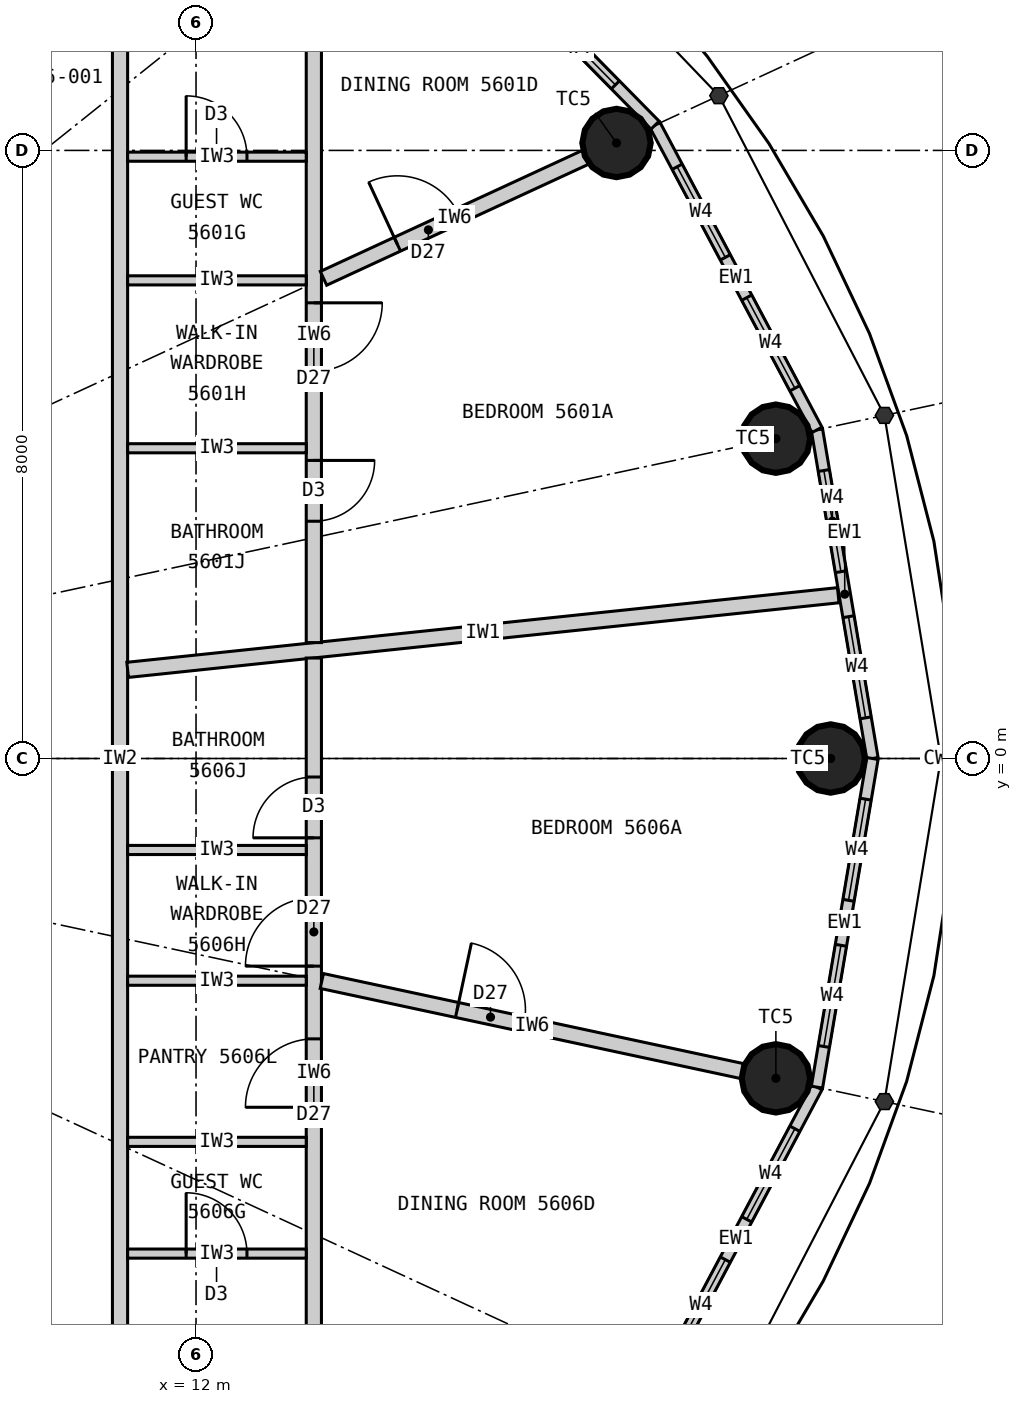
"""IFC4 building model, lengths in metres.
Left out: names, types, materials, properties, quantities, classifications, styles, units other than length and angle.
Written with IfcOpenShell. Run it as: python <this file> out.ifc"""

import sys

from ifc_helpers import new_model, si_unit, direction, frame, frame_2d, origin, origin_2d, place, context, subcontext, project, spatial, rectangle, circle, extrude, element, fill, save


model = new_model("IFC4")
c1 = context("Model", 3, precision=1e-05, world=origin(), true_north=direction((0.0, 1.0)))
c2 = subcontext(c1, "Body", "Model", "MODEL_VIEW")
j1 = project(units=[si_unit("LENGTHUNIT", "METRE"), si_unit("PLANEANGLEUNIT", "RADIAN")], contexts=[c1])
p1 = place(None, origin())
s1 = spatial("IfcSite", under=j1, at=p1, CompositionType="ELEMENT")
p2 = place(p1, origin())
s2 = spatial("IfcBuilding", under=s1, at=p2, CompositionType="ELEMENT")
p3 = place(p2, frame((0.0, 0.0, 209.4)))
s3 = spatial("IfcBuildingStorey", under=s2, at=p3, CompositionType="ELEMENT", Elevation=209.4)
for number, where, z_axis, x_axis in (
    (1, (20.35, 0.0, 0.0), (0.0, 0.0, 1.0), (1.0, 0.0, 0.0)),
    (2, (19.629, 4.208, 0.0), (0.0, 0.0, 1.0), (1.0, 0.0, 0.0)),
    (3, (17.532, 8.098, 0.0), (0.0, 0.0, 1.0), (1.0, 0.0, 0.0)),
    (4, (19.629, -4.208, 0.0), (0.0, 0.0, 1.0), (1.0, 0.0, 0.0)),
):
    element("IfcColumn", number, at=place(p3, frame(where, z_axis=z_axis, x_axis=x_axis)), inside=s3, PredefinedType="COLUMN", context=c2, shape_type="SweptSolid", body=[
        extrude(circle(Radius=0.45, at=origin_2d()), origin(), (0.0, 0.0, 1.0), 3.3),
    ])
p4 = place(p3, frame((20.9, 0.0, 0.0), z_axis=(0.0, 0.0, 1.0), x_axis=(-0.166538513568, 0.986034950445, 0.0)))
e5 = element("IfcWall", 5, at=p4, inside=s3, PredefinedType="ELEMENTEDWALL", context=c2, shape_type="SweptSolid", body=[
    extrude(rectangle(XDim=4.385, YDim=0.15, at=frame_2d((2.192, 0.0))), origin(), (0.0, 0.0, 1.0), 3.12),
])
p5 = place(p4, frame((0.542, 0.0, 0.9)))
e6 = element("IfcOpeningElement", 6, at=p5, cuts=e5, PredefinedType="OPENING", context=c2, shape_type="SweptSolid", body=[
    extrude(rectangle(XDim=1.35, YDim=1.9, at=frame_2d((0.675, 0.95))), frame((0.0, 0.085, 0.0), z_axis=(0.0, -1.0, 0.0), x_axis=(1.0, 0.0, 0.0)), (0.0, 0.0, 1.0), 0.17),
])
p6 = place(p4, frame((2.492, 0.0, 0.9)))
e7 = element("IfcOpeningElement", 7, at=p6, cuts=e5, PredefinedType="OPENING", context=c2, shape_type="SweptSolid", body=[
    extrude(rectangle(XDim=1.35, YDim=1.9, at=frame_2d((0.675, 0.95))), frame((0.0, 0.085, 0.0), z_axis=(0.0, -1.0, 0.0), x_axis=(1.0, 0.0, 0.0)), (0.0, 0.0, 1.0), 0.17),
])
p7 = place(p3, frame((20.17, 4.323, 0.0), z_axis=(0.0, 0.0, 1.0), x_axis=(-0.469256152955, 0.883062094597, 0.0)))
e8 = element("IfcWall", 8, at=p7, inside=s3, PredefinedType="ELEMENTEDWALL", context=c2, shape_type="SweptSolid", body=[
    extrude(rectangle(XDim=4.539, YDim=0.15, at=frame_2d((2.27, 0.0))), origin(), (0.0, 0.0, 1.0), 3.12),
])
p8 = place(p7, frame((0.62, 0.0, 0.9)))
e9 = element("IfcOpeningElement", 9, at=p8, cuts=e8, PredefinedType="OPENING", context=c2, shape_type="SweptSolid", body=[
    extrude(rectangle(XDim=1.35, YDim=1.9, at=frame_2d((0.675, 0.95))), frame((0.0, 0.085, 0.0), z_axis=(0.0, -1.0, 0.0), x_axis=(1.0, 0.0, 0.0)), (0.0, 0.0, 1.0), 0.17),
])
p9 = place(p7, frame((2.57, 0.0, 0.9)))
e10 = element("IfcOpeningElement", 10, at=p9, cuts=e8, PredefinedType="OPENING", context=c2, shape_type="SweptSolid", body=[
    extrude(rectangle(XDim=1.35, YDim=1.9, at=frame_2d((0.675, 0.95))), frame((0.0, 0.085, 0.0), z_axis=(0.0, -1.0, 0.0), x_axis=(1.0, 0.0, 0.0)), (0.0, 0.0, 1.0), 0.17),
])
p10 = place(p3, frame((18.04, 8.332, 0.0), z_axis=(0.0, 0.0, 1.0), x_axis=(-0.701527379618, 0.712642501993, 0.0)))
e11 = element("IfcWall", 11, at=p10, inside=s3, PredefinedType="ELEMENTEDWALL", context=c2, shape_type="SweptSolid", body=[
    extrude(rectangle(XDim=4.788, YDim=0.15, at=frame_2d((2.394, 0.0))), origin(), (0.0, 0.0, 1.0), 3.12),
])
p11 = place(p10, frame((0.744, 0.0, 0.9)))
e12 = element("IfcOpeningElement", 12, at=p11, cuts=e11, PredefinedType="OPENING", context=c2, shape_type="SweptSolid", body=[
    extrude(rectangle(XDim=1.35, YDim=1.9, at=frame_2d((0.675, 0.95))), frame((0.0, 0.085, 0.0), z_axis=(0.0, -1.0, 0.0), x_axis=(1.0, 0.0, 0.0)), (0.0, 0.0, 1.0), 0.17),
])
p12 = place(p10, frame((2.694, 0.0, 0.9)))
e13 = element("IfcOpeningElement", 13, at=p12, cuts=e11, PredefinedType="OPENING", context=c2, shape_type="SweptSolid", body=[
    extrude(rectangle(XDim=1.35, YDim=1.9, at=frame_2d((0.675, 0.95))), frame((0.0, 0.085, 0.0), z_axis=(0.0, -1.0, 0.0), x_axis=(1.0, 0.0, 0.0)), (0.0, 0.0, 1.0), 0.17),
])
p13 = place(p3, frame((18.04, -8.332, 0.0), z_axis=(0.0, 0.0, 1.0), x_axis=(0.469256152955, 0.883062094597, 0.0)))
e14 = element("IfcWall", 14, at=p13, inside=s3, PredefinedType="ELEMENTEDWALL", context=c2, shape_type="SweptSolid", body=[
    extrude(rectangle(XDim=4.539, YDim=0.15, at=frame_2d((2.27, 0.0))), origin(), (0.0, 0.0, 1.0), 3.12),
])
p14 = place(p13, frame((0.62, 0.0, 0.9)))
e15 = element("IfcOpeningElement", 15, at=p14, cuts=e14, PredefinedType="OPENING", context=c2, shape_type="SweptSolid", body=[
    extrude(rectangle(XDim=1.35, YDim=1.9, at=frame_2d((0.675, 0.95))), frame((0.0, 0.085, 0.0), z_axis=(0.0, -1.0, 0.0), x_axis=(1.0, 0.0, 0.0)), (0.0, 0.0, 1.0), 0.17),
])
p15 = place(p13, frame((2.57, 0.0, 0.9)))
e16 = element("IfcOpeningElement", 16, at=p15, cuts=e14, PredefinedType="OPENING", context=c2, shape_type="SweptSolid", body=[
    extrude(rectangle(XDim=1.35, YDim=1.9, at=frame_2d((0.675, 0.95))), frame((0.0, 0.085, 0.0), z_axis=(0.0, -1.0, 0.0), x_axis=(1.0, 0.0, 0.0)), (0.0, 0.0, 1.0), 0.17),
])
p16 = place(p3, frame((20.17, -4.323, 0.0), z_axis=(0.0, 0.0, 1.0), x_axis=(0.166538513568, 0.986034950445, 0.0)))
e17 = element("IfcWall", 17, at=p16, inside=s3, PredefinedType="ELEMENTEDWALL", context=c2, shape_type="SweptSolid", body=[
    extrude(rectangle(XDim=4.385, YDim=0.15, at=frame_2d((2.192, 0.0))), origin(), (0.0, 0.0, 1.0), 3.12),
])
p17 = place(p16, frame((0.542, 0.0, 0.9)))
e18 = element("IfcOpeningElement", 18, at=p17, cuts=e17, PredefinedType="OPENING", context=c2, shape_type="SweptSolid", body=[
    extrude(rectangle(XDim=1.35, YDim=1.9, at=frame_2d((0.675, 0.95))), frame((0.0, 0.085, 0.0), z_axis=(0.0, -1.0, 0.0), x_axis=(1.0, 0.0, 0.0)), (0.0, 0.0, 1.0), 0.17),
])
p18 = place(p16, frame((2.492, 0.0, 0.9)))
e19 = element("IfcOpeningElement", 19, at=p18, cuts=e17, PredefinedType="OPENING", context=c2, shape_type="SweptSolid", body=[
    extrude(rectangle(XDim=1.35, YDim=1.9, at=frame_2d((0.675, 0.95))), frame((0.0, 0.085, 0.0), z_axis=(0.0, -1.0, 0.0), x_axis=(1.0, 0.0, 0.0)), (0.0, 0.0, 1.0), 0.17),
])
p19 = place(p3, frame((11.0, -9.9, 0.0), z_axis=(0.0, 0.0, 1.0), x_axis=(0.0, 1.0, 0.0)))
e20 = element("IfcWall", 20, at=p19, inside=s3, PredefinedType="PARTITIONING", context=c2, shape_type="SweptSolid", body=[
    extrude(rectangle(XDim=19.8, YDim=0.2, at=frame_2d((9.9, 0.0))), origin(), (0.0, 0.0, 1.0), 3.12),
])
p20 = place(p3, frame((11.1, 1.166, 0.0), z_axis=(0.0, 0.0, 1.0), x_axis=(0.994527487125, 0.104475247564, 0.0)))
e21 = element("IfcWall", 21, at=p20, inside=s3, PredefinedType="PARTITIONING", context=c2, shape_type="SweptSolid", body=[
    extrude(rectangle(XDim=9.401, YDim=0.2, at=frame_2d((4.701, 0.0))), origin(), (0.0, 0.0, 1.0), 2.47),
])
p21 = place(p3, frame((13.55, 1.525, 0.0), z_axis=(0.0, 0.0, 1.0), x_axis=(0.0, 1.0, 0.0)))
e22 = element("IfcWall", 22, at=p21, inside=s3, PredefinedType="PARTITIONING", context=c2, shape_type="SweptSolid", body=[
    extrude(rectangle(XDim=8.084, YDim=0.2, at=frame_2d((4.042, 0.0))), origin(), (0.0, 0.0, 1.0), 3.12),
])
p22 = place(p21, frame((1.597, 0.0, 0.0)))
e23 = element("IfcOpeningElement", 23, at=p22, cuts=e22, PredefinedType="OPENING", context=c2, shape_type="SweptSolid", body=[
    extrude(rectangle(XDim=0.8, YDim=2.1, at=frame_2d((0.4, 1.05))), frame((0.0, 0.11, 0.0), z_axis=(0.0, -1.0, 0.0), x_axis=(1.0, 0.0, 0.0)), (0.0, 0.0, 1.0), 0.22),
])
p23 = place(p21, frame((3.57, 0.0, 0.0)))
e24 = element("IfcOpeningElement", 24, at=p23, cuts=e22, PredefinedType="OPENING", context=c2, shape_type="SweptSolid", body=[
    extrude(rectangle(XDim=0.9, YDim=2.1, at=frame_2d((0.45, 1.05))), frame((0.0, 0.11, 0.0), z_axis=(0.0, -1.0, 0.0), x_axis=(1.0, 0.0, 0.0)), (0.0, 0.0, 1.0), 0.22),
])
p24 = place(p3, frame((13.677, 6.317, 0.0), z_axis=(0.0, 0.0, 1.0), x_axis=(0.907825704695, 0.419347695708, 0.0)))
e25 = element("IfcWall", 25, at=p24, inside=s3, PredefinedType="PARTITIONING", context=c2, shape_type="SweptSolid", body=[
    extrude(rectangle(XDim=3.796, YDim=0.2, at=frame_2d((1.898, 0.0))), origin(), (0.0, 0.0, 1.0), 2.32),
])
p25 = place(p24, frame((1.07, 0.0, 0.0)))
e26 = element("IfcOpeningElement", 26, at=p25, cuts=e25, PredefinedType="OPENING", context=c2, shape_type="SweptSolid", body=[
    extrude(rectangle(XDim=0.9, YDim=2.1, at=frame_2d((0.45, 1.05))), frame((0.0, 0.11, 0.0), z_axis=(0.0, -1.0, 0.0), x_axis=(1.0, 0.0, 0.0)), (0.0, 0.0, 1.0), 0.22),
])
for number, where, z_axis, x_axis in (
    (27, (11.1, 4.082, 0.0), (0.0, 0.0, 1.0), (1.0, 0.0, 0.0)),
    (28, (11.1, 6.29, 0.0), (0.0, 0.0, 1.0), (1.0, 0.0, 0.0)),
):
    element("IfcWall", number, at=place(p3, frame(where, z_axis=z_axis, x_axis=x_axis)), inside=s3, PredefinedType="PARTITIONING", context=c2, shape_type="SweptSolid", body=[
        extrude(rectangle(XDim=2.35, YDim=0.12, at=frame_2d((1.175, 0.0))), origin(), (0.0, 0.0, 1.0), 3.12),
    ])
p26 = place(p3, frame((11.1, 7.917, 0.0), z_axis=(0.0, 0.0, 1.0), x_axis=(1.0, 0.0, 0.0)))
e29 = element("IfcWall", 29, at=p26, inside=s3, PredefinedType="PARTITIONING", context=c2, shape_type="SweptSolid", body=[
    extrude(rectangle(XDim=2.35, YDim=0.12, at=frame_2d((1.175, 0.0))), origin(), (0.0, 0.0, 1.0), 3.12),
])
p27 = place(p26, frame((0.77, 0.0, 0.0)))
e30 = element("IfcOpeningElement", 30, at=p27, cuts=e29, PredefinedType="OPENING", context=c2, shape_type="SweptSolid", body=[
    extrude(rectangle(XDim=0.8, YDim=2.1, at=frame_2d((0.4, 1.05))), frame((0.0, 0.07, 0.0), z_axis=(0.0, -1.0, 0.0), x_axis=(1.0, 0.0, 0.0)), (0.0, 0.0, 1.0), 0.14),
])
p28 = place(p3, frame((13.55, -9.609, 0.0), z_axis=(0.0, 0.0, 1.0), x_axis=(0.0, 1.0, 0.0)))
e31 = element("IfcWall", 31, at=p28, inside=s3, PredefinedType="PARTITIONING", context=c2, shape_type="SweptSolid", body=[
    extrude(rectangle(XDim=10.93, YDim=0.2, at=frame_2d((5.465, 0.0))), origin(), (0.0, 0.0, 1.0), 3.12),
])
p29 = place(p28, frame((5.02, 0.0, 0.0)))
e32 = element("IfcOpeningElement", 32, at=p29, cuts=e31, PredefinedType="OPENING", context=c2, shape_type="SweptSolid", body=[
    extrude(rectangle(XDim=0.9, YDim=2.1, at=frame_2d((0.45, 1.05))), frame((0.0, 0.11, 0.0), z_axis=(0.0, -1.0, 0.0), x_axis=(1.0, 0.0, 0.0)), (0.0, 0.0, 1.0), 0.22),
])
p30 = place(p28, frame((6.877, 0.0, 0.0)))
e33 = element("IfcOpeningElement", 33, at=p30, cuts=e31, PredefinedType="OPENING", context=c2, shape_type="SweptSolid", body=[
    extrude(rectangle(XDim=0.9, YDim=2.1, at=frame_2d((0.45, 1.05))), frame((0.0, 0.11, 0.0), z_axis=(0.0, -1.0, 0.0), x_axis=(1.0, 0.0, 0.0)), (0.0, 0.0, 1.0), 0.22),
])
p31 = place(p28, frame((8.565, 0.0, 0.0)))
e34 = element("IfcOpeningElement", 34, at=p31, cuts=e31, PredefinedType="OPENING", context=c2, shape_type="SweptSolid", body=[
    extrude(rectangle(XDim=0.8, YDim=2.1, at=frame_2d((0.4, 1.05))), frame((0.0, 0.11, 0.0), z_axis=(0.0, -1.0, 0.0), x_axis=(1.0, 0.0, 0.0)), (0.0, 0.0, 1.0), 0.22),
])
p32 = place(p3, frame((13.655, -2.927, 0.0), z_axis=(0.0, 0.0, 1.0), x_axis=(0.977790419294, -0.209585056568, 0.0)))
e35 = element("IfcWall", 35, at=p32, inside=s3, PredefinedType="PARTITIONING", context=c2, shape_type="SweptSolid", body=[
    extrude(rectangle(XDim=5.66, YDim=0.2, at=frame_2d((2.83, 0.0))), origin(), (0.0, 0.0, 1.0), 2.42),
])
p33 = place(p32, frame((1.82, 0.0, 0.0)))
e36 = element("IfcOpeningElement", 36, at=p33, cuts=e35, PredefinedType="OPENING", context=c2, shape_type="SweptSolid", body=[
    extrude(rectangle(XDim=0.9, YDim=2.1, at=frame_2d((0.45, 1.05))), frame((0.0, 0.11, 0.0), z_axis=(0.0, -1.0, 0.0), x_axis=(1.0, 0.0, 0.0)), (0.0, 0.0, 1.0), 0.22),
])
p34 = place(p3, frame((11.1, -6.514, 0.0), z_axis=(0.0, 0.0, 1.0), x_axis=(1.0, 0.0, 0.0)))
e37 = element("IfcWall", 37, at=p34, inside=s3, PredefinedType="PARTITIONING", context=c2, shape_type="SweptSolid", body=[
    extrude(rectangle(XDim=2.35, YDim=0.12, at=frame_2d((1.175, 0.0))), origin(), (0.0, 0.0, 1.0), 3.12),
])
p35 = place(p34, frame((0.77, 0.0, 0.0)))
e38 = element("IfcOpeningElement", 38, at=p35, cuts=e37, PredefinedType="OPENING", context=c2, shape_type="SweptSolid", body=[
    extrude(rectangle(XDim=0.8, YDim=2.1, at=frame_2d((0.4, 1.05))), frame((0.0, 0.07, 0.0), z_axis=(0.0, -1.0, 0.0), x_axis=(1.0, 0.0, 0.0)), (0.0, 0.0, 1.0), 0.14),
])
p36 = place(p3, frame((11.1, -5.044, 0.0), z_axis=(0.0, 0.0, 1.0), x_axis=(1.0, 0.0, 0.0)))
e39 = element("IfcWall", 39, at=p36, inside=s3, PredefinedType="PARTITIONING", context=c2, shape_type="SweptSolid", body=[
    extrude(rectangle(XDim=2.35, YDim=0.12, at=frame_2d((1.175, 0.0))), origin(), (0.0, 0.0, 1.0), 3.12),
])
p37 = place(p3, frame((11.1, -2.924, 0.0), z_axis=(0.0, 0.0, 1.0), x_axis=(1.0, 0.0, 0.0)))
e40 = element("IfcWall", 40, at=p37, inside=s3, PredefinedType="PARTITIONING", context=c2, shape_type="SweptSolid", body=[
    extrude(rectangle(XDim=2.35, YDim=0.12, at=frame_2d((1.175, 0.0))), origin(), (0.0, 0.0, 1.0), 2.42),
])
p38 = place(p3, frame((11.1, -1.204, 0.0), z_axis=(0.0, 0.0, 1.0), x_axis=(1.0, 0.0, 0.0)))
e41 = element("IfcWall", 41, at=p38, inside=s3, PredefinedType="PARTITIONING", context=c2, shape_type="SweptSolid", body=[
    extrude(rectangle(XDim=2.35, YDim=0.12, at=frame_2d((1.175, 0.0))), origin(), (0.0, 0.0, 1.0), 3.12),
])
p39 = place(p5, origin())
e42 = element("IfcWindow", 42, at=p39, inside=s3, PartitioningType="SINGLE_PANEL", PredefinedType="WINDOW", context=c2, shape_type="SweptSolid", body=[
    extrude(rectangle(XDim=1.35, YDim=1.9, at=frame_2d((0.675, 0.95))), frame((0.0, 0.03, 0.0), z_axis=(0.0, -1.0, 0.0), x_axis=(1.0, 0.0, 0.0)), (0.0, 0.0, 1.0), 0.06),
])
fill(e6, e42)
p40 = place(p6, origin())
e43 = element("IfcWindow", 43, at=p40, inside=s3, PartitioningType="SINGLE_PANEL", PredefinedType="WINDOW", context=c2, shape_type="SweptSolid", body=[
    extrude(rectangle(XDim=1.35, YDim=1.9, at=frame_2d((0.675, 0.95))), frame((0.0, 0.03, 0.0), z_axis=(0.0, -1.0, 0.0), x_axis=(1.0, 0.0, 0.0)), (0.0, 0.0, 1.0), 0.06),
])
fill(e7, e43)
p41 = place(p8, origin())
e44 = element("IfcWindow", 44, at=p41, inside=s3, PartitioningType="SINGLE_PANEL", PredefinedType="WINDOW", context=c2, shape_type="SweptSolid", body=[
    extrude(rectangle(XDim=1.35, YDim=1.9, at=frame_2d((0.675, 0.95))), frame((0.0, 0.03, 0.0), z_axis=(0.0, -1.0, 0.0), x_axis=(1.0, 0.0, 0.0)), (0.0, 0.0, 1.0), 0.06),
])
fill(e9, e44)
p42 = place(p9, origin())
e45 = element("IfcWindow", 45, at=p42, inside=s3, PartitioningType="SINGLE_PANEL", PredefinedType="WINDOW", context=c2, shape_type="SweptSolid", body=[
    extrude(rectangle(XDim=1.35, YDim=1.9, at=frame_2d((0.675, 0.95))), frame((0.0, 0.03, 0.0), z_axis=(0.0, -1.0, 0.0), x_axis=(1.0, 0.0, 0.0)), (0.0, 0.0, 1.0), 0.06),
])
fill(e10, e45)
p43 = place(p11, origin())
e46 = element("IfcWindow", 46, at=p43, inside=s3, PartitioningType="SINGLE_PANEL", PredefinedType="WINDOW", context=c2, shape_type="SweptSolid", body=[
    extrude(rectangle(XDim=1.35, YDim=1.9, at=frame_2d((0.675, 0.95))), frame((0.0, 0.03, 0.0), z_axis=(0.0, -1.0, 0.0), x_axis=(1.0, 0.0, 0.0)), (0.0, 0.0, 1.0), 0.06),
])
fill(e12, e46)
p44 = place(p14, origin())
e47 = element("IfcWindow", 47, at=p44, inside=s3, PartitioningType="SINGLE_PANEL", PredefinedType="WINDOW", context=c2, shape_type="SweptSolid", body=[
    extrude(rectangle(XDim=1.35, YDim=1.9, at=frame_2d((0.675, 0.95))), frame((0.0, 0.03, 0.0), z_axis=(0.0, -1.0, 0.0), x_axis=(1.0, 0.0, 0.0)), (0.0, 0.0, 1.0), 0.06),
])
fill(e15, e47)
p45 = place(p15, origin())
e48 = element("IfcWindow", 48, at=p45, inside=s3, PartitioningType="SINGLE_PANEL", PredefinedType="WINDOW", context=c2, shape_type="SweptSolid", body=[
    extrude(rectangle(XDim=1.35, YDim=1.9, at=frame_2d((0.675, 0.95))), frame((0.0, 0.03, 0.0), z_axis=(0.0, -1.0, 0.0), x_axis=(1.0, 0.0, 0.0)), (0.0, 0.0, 1.0), 0.06),
])
fill(e16, e48)
p46 = place(p17, origin())
e49 = element("IfcWindow", 49, at=p46, inside=s3, PartitioningType="SINGLE_PANEL", PredefinedType="WINDOW", context=c2, shape_type="SweptSolid", body=[
    extrude(rectangle(XDim=1.35, YDim=1.9, at=frame_2d((0.675, 0.95))), frame((0.0, 0.03, 0.0), z_axis=(0.0, -1.0, 0.0), x_axis=(1.0, 0.0, 0.0)), (0.0, 0.0, 1.0), 0.06),
])
fill(e18, e49)
p47 = place(p18, origin())
e50 = element("IfcWindow", 50, at=p47, inside=s3, PartitioningType="SINGLE_PANEL", PredefinedType="WINDOW", context=c2, shape_type="SweptSolid", body=[
    extrude(rectangle(XDim=1.35, YDim=1.9, at=frame_2d((0.675, 0.95))), frame((0.0, 0.03, 0.0), z_axis=(0.0, -1.0, 0.0), x_axis=(1.0, 0.0, 0.0)), (0.0, 0.0, 1.0), 0.06),
])
fill(e19, e50)
p48 = place(p22, origin())
e51 = element("IfcDoor", 51, at=p48, inside=s3, OperationType="SINGLE_SWING_RIGHT", PredefinedType="DOOR", context=c2, shape_type="SweptSolid", body=[
    extrude(rectangle(XDim=0.8, YDim=2.1, at=frame_2d((0.4, 1.05))), frame((0.0, 0.025, 0.0), z_axis=(0.0, -1.0, 0.0), x_axis=(1.0, 0.0, 0.0)), (0.0, 0.0, 1.0), 0.05),
])
fill(e23, e51)
p49 = place(p23, origin())
e52 = element("IfcDoor", 52, at=p49, inside=s3, OperationType="SINGLE_SWING_RIGHT", PredefinedType="DOOR", context=c2, shape_type="SweptSolid", body=[
    extrude(rectangle(XDim=0.9, YDim=2.1, at=frame_2d((0.45, 1.05))), frame((0.0, 0.025, 0.0), z_axis=(0.0, -1.0, 0.0), x_axis=(1.0, 0.0, 0.0)), (0.0, 0.0, 1.0), 0.05),
])
fill(e24, e52)
p50 = place(p27, origin())
e53 = element("IfcDoor", 53, at=p50, inside=s3, OperationType="SINGLE_SWING_LEFT", PredefinedType="DOOR", context=c2, shape_type="SweptSolid", body=[
    extrude(rectangle(XDim=0.8, YDim=2.1, at=frame_2d((0.4, 1.05))), frame((0.0, 0.025, 0.0), z_axis=(0.0, -1.0, 0.0), x_axis=(1.0, 0.0, 0.0)), (0.0, 0.0, 1.0), 0.05),
])
fill(e30, e53)
p51 = place(p25, origin())
e54 = element("IfcDoor", 54, at=p51, inside=s3, OperationType="SINGLE_SWING_LEFT", PredefinedType="DOOR", context=c2, shape_type="SweptSolid", body=[
    extrude(rectangle(XDim=0.9, YDim=2.1, at=frame_2d((0.45, 1.05))), frame((0.0, 0.025, 0.0), z_axis=(0.0, -1.0, 0.0), x_axis=(1.0, 0.0, 0.0)), (0.0, 0.0, 1.0), 0.05),
])
fill(e26, e54)
p52 = place(p35, origin())
e55 = element("IfcDoor", 55, at=p52, inside=s3, OperationType="SINGLE_SWING_LEFT", PredefinedType="DOOR", context=c2, shape_type="SweptSolid", body=[
    extrude(rectangle(XDim=0.8, YDim=2.1, at=frame_2d((0.4, 1.05))), frame((0.0, 0.025, 0.0), z_axis=(0.0, -1.0, 0.0), x_axis=(1.0, 0.0, 0.0)), (0.0, 0.0, 1.0), 0.05),
])
fill(e38, e55)
p53 = place(p29, origin())
e56 = element("IfcDoor", 56, at=p53, inside=s3, OperationType="SINGLE_SWING_LEFT", PredefinedType="DOOR", context=c2, shape_type="SweptSolid", body=[
    extrude(rectangle(XDim=0.9, YDim=2.1, at=frame_2d((0.45, 1.05))), frame((0.0, 0.025, 0.0), z_axis=(0.0, -1.0, 0.0), x_axis=(1.0, 0.0, 0.0)), (0.0, 0.0, 1.0), 0.05),
])
fill(e32, e56)
p54 = place(p30, origin())
e57 = element("IfcDoor", 57, at=p54, inside=s3, OperationType="SINGLE_SWING_LEFT", PredefinedType="DOOR", context=c2, shape_type="SweptSolid", body=[
    extrude(rectangle(XDim=0.9, YDim=2.1, at=frame_2d((0.45, 1.05))), frame((0.0, 0.025, 0.0), z_axis=(0.0, -1.0, 0.0), x_axis=(1.0, 0.0, 0.0)), (0.0, 0.0, 1.0), 0.05),
])
fill(e33, e57)
p55 = place(p31, origin())
e58 = element("IfcDoor", 58, at=p55, inside=s3, OperationType="SINGLE_SWING_LEFT", PredefinedType="DOOR", context=c2, shape_type="SweptSolid", body=[
    extrude(rectangle(XDim=0.8, YDim=2.1, at=frame_2d((0.4, 1.05))), frame((0.0, 0.025, 0.0), z_axis=(0.0, -1.0, 0.0), x_axis=(1.0, 0.0, 0.0)), (0.0, 0.0, 1.0), 0.05),
])
fill(e34, e58)
p56 = place(p33, origin())
e59 = element("IfcDoor", 59, at=p56, inside=s3, OperationType="SINGLE_SWING_LEFT", PredefinedType="DOOR", context=c2, shape_type="SweptSolid", body=[
    extrude(rectangle(XDim=0.9, YDim=2.1, at=frame_2d((0.45, 1.05))), frame((0.0, 0.025, 0.0), z_axis=(0.0, -1.0, 0.0), x_axis=(1.0, 0.0, 0.0)), (0.0, 0.0, 1.0), 0.05),
])
fill(e36, e59)
save(model, sys.argv[1])
